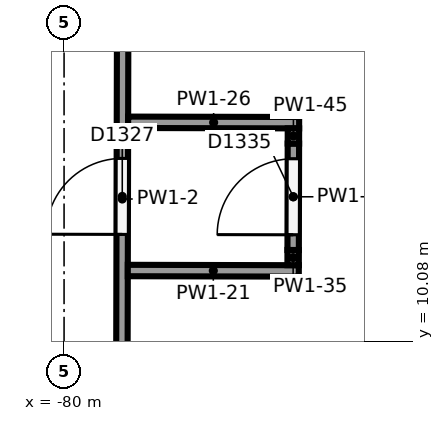
"""IFC4 building model, lengths in metres.
Left out: names, types, materials, properties, quantities, classifications, styles, units other than length and angle.
Written with IfcOpenShell. Run it as: python <this file> out.ifc"""

import sys

from ifc_helpers import new_model, si_unit, direction, frame, frame_2d, origin, place, context, subcontext, project, spatial, rectangle, extrude, element, fill, save


model = new_model("IFC4")
c1 = context("Model", 3, precision=1e-05, world=origin(), true_north=direction((0.0, 1.0)))
c2 = subcontext(c1, "Body", "Model", "MODEL_VIEW")
j1 = project(units=[si_unit("LENGTHUNIT", "METRE"), si_unit("PLANEANGLEUNIT", "RADIAN")], contexts=[c1])
p1 = place(None, origin())
s1 = spatial("IfcSite", under=j1, at=p1, CompositionType="ELEMENT")
p2 = place(p1, origin())
s2 = spatial("IfcBuilding", under=s1, at=p2, CompositionType="ELEMENT")
p3 = place(p2, frame((0.0, 0.0, 18.0)))
s3 = spatial("IfcBuildingStorey", under=s2, at=p3, CompositionType="ELEMENT", Elevation=18.0)
p4 = place(p3, frame((-79.247, 6.537, 0.0), z_axis=(0.0, 0.0, 1.0), x_axis=(0.002276512155, 0.999997408743, 0.0)))
e1 = element("IfcWall", 1, at=p4, inside=s3, PredefinedType="PARTITIONING", context=c2, shape_type="SweptSolid", body=[
    extrude(rectangle(XDim=10.832, YDim=0.15, at=frame_2d((5.416, 0.0))), origin(), (0.0, 0.0, 1.0), 3.499),
])
p5 = place(p4, frame((4.95, 0.0, 0.0)))
e2 = element("IfcOpeningElement", 2, at=p5, cuts=e1, PredefinedType="OPENING", context=c2, shape_type="SweptSolid", body=[
    extrude(rectangle(XDim=1.0, YDim=2.1, at=frame_2d((0.5, 1.05))), frame((0.0, 0.085, 0.0), z_axis=(0.0, -1.0, 0.0), x_axis=(1.0, 0.0, 0.0)), (0.0, 0.0, 1.0), 0.17),
])
p6 = place(p3, frame((-79.162, 11.011, 0.0), z_axis=(0.0, 0.0, 1.0), x_axis=(0.999997403897, -0.002278639918, 0.0)))
e3 = element("IfcWall", 3, at=p6, inside=s3, PredefinedType="PARTITIONING", context=c2, shape_type="SweptSolid", body=[
    extrude(rectangle(XDim=2.25, YDim=0.15, at=frame_2d((1.125, 0.0))), origin(), (0.0, 0.0, 1.0), 5.636),
])
p7 = place(p3, frame((-79.157, 12.961, 0.0), z_axis=(0.0, 0.0, 1.0), x_axis=(0.999997403897, -0.002278639918, 0.0)))
e4 = element("IfcWall", 4, at=p7, inside=s3, PredefinedType="PARTITIONING", context=c2, shape_type="SweptSolid", body=[
    extrude(rectangle(XDim=2.25, YDim=0.15, at=frame_2d((1.125, 0.0))), origin(), (0.0, 0.0, 1.0), 5.66),
])
p8 = place(p3, frame((-76.986, 11.082, 0.0), z_axis=(0.0, 0.0, 1.0), x_axis=(0.002441995161, 0.999997018325, 0.0)))
e5 = element("IfcWall", 5, at=p8, inside=s3, PredefinedType="PARTITIONING", context=c2, shape_type="SweptSolid", body=[
    extrude(rectangle(XDim=0.2, YDim=0.15, at=frame_2d((0.1, 0.0))), origin(), (0.0, 0.0, 1.0), 5.684),
])
p9 = place(p3, frame((-76.986, 11.281, 0.0), z_axis=(0.0, 0.0, 1.0), x_axis=(0.002266777088, 0.999997430858, 0.0)))
e6 = element("IfcWall", 6, at=p9, inside=s3, PredefinedType="PARTITIONING", context=c2, shape_type="SweptSolid", body=[
    extrude(rectangle(XDim=1.4, YDim=0.15, at=frame_2d((0.7, 0.0))), origin(), (0.0, 0.0, 1.0), 5.687),
])
p10 = place(p9, frame((0.2, 0.0, 0.0)))
e7 = element("IfcOpeningElement", 7, at=p10, cuts=e6, PredefinedType="OPENING", context=c2, shape_type="SweptSolid", body=[
    extrude(rectangle(XDim=1.0, YDim=2.1, at=frame_2d((0.5, 1.05))), frame((0.0, 0.085, 0.0), z_axis=(0.0, -1.0, 0.0), x_axis=(1.0, 0.0, 0.0)), (0.0, 0.0, 1.0), 0.17),
])
p11 = place(p3, frame((-76.983, 12.682, 0.0), z_axis=(0.0, 0.0, 1.0), x_axis=(0.002441995161, 0.999997018325, 0.0)))
e8 = element("IfcWall", 8, at=p11, inside=s3, PredefinedType="PARTITIONING", context=c2, shape_type="SweptSolid", body=[
    extrude(rectangle(XDim=0.2, YDim=0.15, at=frame_2d((0.1, 0.0))), origin(), (0.0, 0.0, 1.0), 5.704),
])
p12 = place(p5, origin())
e9 = element("IfcDoor", 9, at=p12, inside=s3, OperationType="SINGLE_SWING_LEFT", PredefinedType="DOOR", context=c2, shape_type="SweptSolid", body=[
    extrude(rectangle(XDim=1.0, YDim=2.1, at=frame_2d((0.5, 1.05))), frame((0.0, 0.025, 0.0), z_axis=(0.0, -1.0, 0.0), x_axis=(1.0, 0.0, 0.0)), (0.0, 0.0, 1.0), 0.05),
])
fill(e2, e9)
p13 = place(p10, origin())
e10 = element("IfcDoor", 10, at=p13, inside=s3, OperationType="SINGLE_SWING_LEFT", PredefinedType="DOOR", context=c2, shape_type="SweptSolid", body=[
    extrude(rectangle(XDim=1.0, YDim=2.1, at=frame_2d((0.5, 1.05))), frame((0.0, 0.025, 0.0), z_axis=(0.0, -1.0, 0.0), x_axis=(1.0, 0.0, 0.0)), (0.0, 0.0, 1.0), 0.05),
])
fill(e7, e10)
save(model, sys.argv[1])
